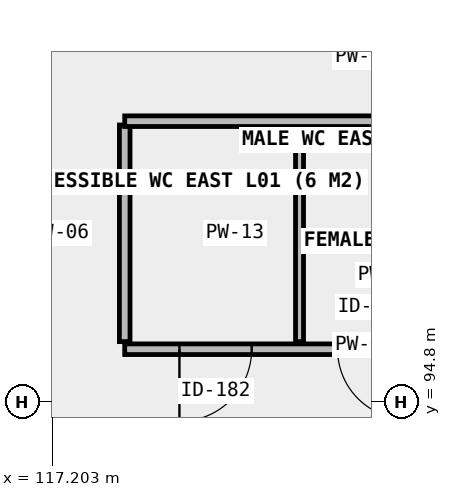
"""IFC4 building model, lengths in metres.
Left out: names, types, materials, properties, quantities, classifications, styles, units other than length and angle.
Written with IfcOpenShell. Run it as: python <this file> out.ifc"""

import sys

from ifc_helpers import new_model, si_unit, direction, frame, frame_2d, origin, place, context, subcontext, project, spatial, rectangle, extrude, element, fill, save


model = new_model("IFC4")
c1 = context("Model", 3, precision=1e-05, world=origin(), true_north=direction((0.0, 1.0)))
c2 = subcontext(c1, "Body", "Model", "MODEL_VIEW")
j1 = project(units=[si_unit("LENGTHUNIT", "METRE"), si_unit("PLANEANGLEUNIT", "RADIAN")], contexts=[c1])
p1 = place(None, origin())
s1 = spatial("IfcSite", under=j1, at=p1, CompositionType="ELEMENT")
p2 = place(p1, origin())
s2 = spatial("IfcBuilding", under=s1, at=p2, CompositionType="ELEMENT")
p3 = place(p2, frame((0.0, 0.0, 4.2)))
s3 = spatial("IfcBuildingStorey", under=s2, at=p3, CompositionType="ELEMENT", Elevation=4.2)
p4 = place(p3, frame((118.15, 95.5, 0.0), z_axis=(0.0, 0.0, 1.0), x_axis=(1.0, 0.0, 0.0)))
e1 = element("IfcWall", 1, at=p4, inside=s3, PredefinedType="PLUMBINGWALL", context=c2, shape_type="SweptSolid", body=[
    extrude(rectangle(XDim=6.3, YDim=0.14, at=frame_2d((3.15, 0.0))), origin(), (0.0, 0.0, 1.0), 3.84),
])
p5 = place(p4, frame((0.72, 0.0, 0.0)))
e2 = element("IfcOpeningElement", 2, at=p5, cuts=e1, PredefinedType="OPENING", context=c2, shape_type="SweptSolid", body=[
    extrude(rectangle(XDim=0.95, YDim=2.1, at=frame_2d((0.475, 1.05))), frame((0.0, 0.08, 0.0), z_axis=(0.0, -1.0, 0.0), x_axis=(1.0, 0.0, 0.0)), (0.0, 0.0, 1.0), 0.16),
])
p6 = place(p4, frame((2.8, 0.0, 0.0)))
e3 = element("IfcOpeningElement", 3, at=p6, cuts=e1, PredefinedType="OPENING", context=c2, shape_type="SweptSolid", body=[
    extrude(rectangle(XDim=0.92, YDim=2.1, at=frame_2d((0.46, 1.05))), frame((0.0, 0.08, 0.0), z_axis=(0.0, -1.0, 0.0), x_axis=(1.0, 0.0, 0.0)), (0.0, 0.0, 1.0), 0.16),
])
p7 = place(p4, frame((4.8, 0.0, 0.0)))
e4 = element("IfcOpeningElement", 4, at=p7, cuts=e1, PredefinedType="OPENING", context=c2, shape_type="SweptSolid", body=[
    extrude(rectangle(XDim=0.92, YDim=2.1, at=frame_2d((0.46, 1.05))), frame((0.0, 0.08, 0.0), z_axis=(0.0, -1.0, 0.0), x_axis=(1.0, 0.0, 0.0)), (0.0, 0.0, 1.0), 0.16),
])
p8 = place(p3, frame((118.15, 95.6, 0.0), z_axis=(0.0, 0.0, 1.0), x_axis=(0.0, 1.0, 0.0)))
e5 = element("IfcWall", 5, at=p8, inside=s3, PredefinedType="PLUMBINGWALL", context=c2, shape_type="SweptSolid", body=[
    extrude(rectangle(XDim=2.85, YDim=0.14, at=frame_2d((1.425, 0.0))), origin(), (0.0, 0.0, 1.0), 3.84),
])
p9 = place(p3, frame((120.45, 95.6, 0.0), z_axis=(0.0, 0.0, 1.0), x_axis=(0.0, 1.0, 0.0)))
e6 = element("IfcWall", 6, at=p9, inside=s3, PredefinedType="PARTITIONING", context=c2, shape_type="SweptSolid", body=[
    extrude(rectangle(XDim=2.85, YDim=0.105, at=frame_2d((1.425, 0.0))), origin(), (0.0, 0.0, 1.0), 3.84),
])
p10 = place(p3, frame((118.15, 98.5, 0.0), z_axis=(0.0, 0.0, 1.0), x_axis=(1.0, 0.0, 0.0)))
e7 = element("IfcWall", 7, at=p10, inside=s3, PredefinedType="PLUMBINGWALL", context=c2, shape_type="SweptSolid", body=[
    extrude(rectangle(XDim=6.3, YDim=0.14, at=frame_2d((3.15, 0.0))), origin(), (0.0, 0.0, 1.0), 3.84),
])
p11 = place(p5, frame((0.475, 0.0, 0.0), z_axis=(0.0, 0.0, 1.0), x_axis=(-1.0, 0.0, 0.0)))
e8 = element("IfcDoor", 8, at=p11, inside=s3, OperationType="SINGLE_SWING_LEFT", PredefinedType="DOOR", context=c2, shape_type="SweptSolid", body=[
    extrude(rectangle(XDim=0.95, YDim=2.1, at=frame_2d((0.0, 1.05))), frame((0.0, 0.025, 0.0), z_axis=(0.0, -1.0, 0.0), x_axis=(1.0, 0.0, 0.0)), (0.0, 0.0, 1.0), 0.05),
])
fill(e2, e8)
p12 = place(p6, origin())
e9 = element("IfcDoor", 9, at=p12, inside=s3, OperationType="SINGLE_SWING_RIGHT", PredefinedType="DOOR", context=c2, shape_type="SweptSolid", body=[
    extrude(rectangle(XDim=0.92, YDim=2.1, at=frame_2d((0.46, 1.05))), frame((0.0, 0.025, 0.0), z_axis=(0.0, -1.0, 0.0), x_axis=(1.0, 0.0, 0.0)), (0.0, 0.0, 1.0), 0.05),
])
fill(e3, e9)
save(model, sys.argv[1])
